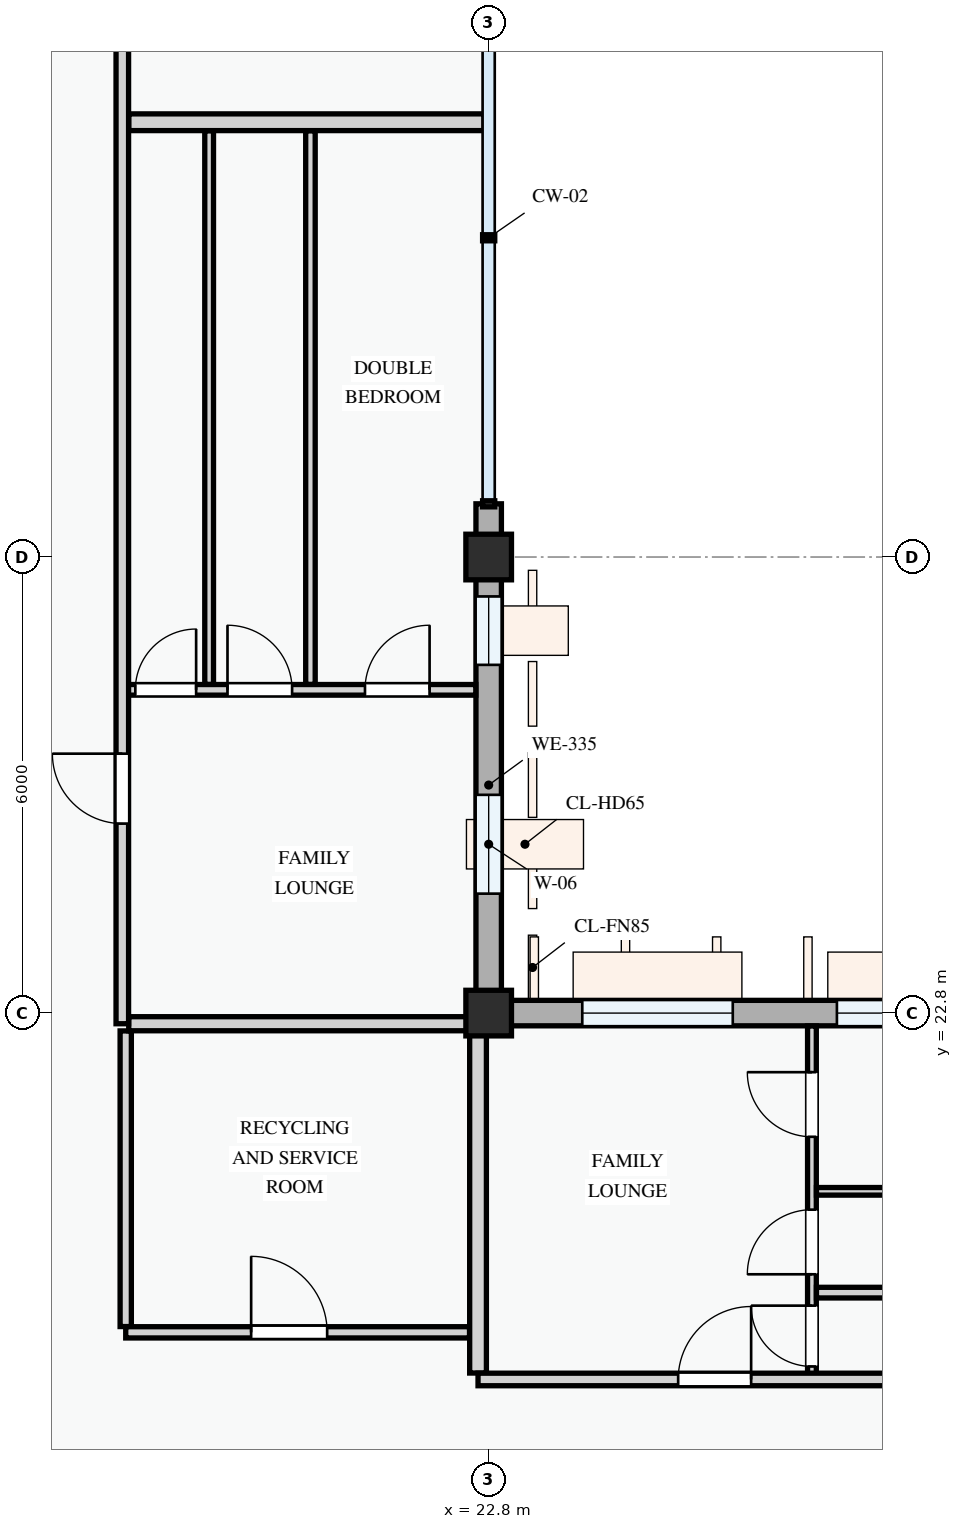
"""IFC4 building model, lengths in metres.
Left out: names, types, materials, properties, quantities, classifications, styles, units other than length and angle.
Written with IfcOpenShell. Run it as: python <this file> out.ifc"""

import sys

from ifc_helpers import new_model, si_unit, direction, frame, frame_2d, origin, origin_2d, place, context, subcontext, project, spatial, rectangle, extrude, element, fill, save


model = new_model("IFC4")
c1 = context("Model", 3, precision=1e-05, world=origin(), true_north=direction((0.0, 1.0)))
c2 = subcontext(c1, "Body", "Model", "MODEL_VIEW")
j1 = project(units=[si_unit("LENGTHUNIT", "METRE"), si_unit("PLANEANGLEUNIT", "RADIAN")], contexts=[c1])
p1 = place(None, origin())
s1 = spatial("IfcSite", under=j1, at=p1, CompositionType="ELEMENT")
p2 = place(p1, origin())
s2 = spatial("IfcBuilding", under=s1, at=p2, CompositionType="ELEMENT")
p3 = place(p2, frame((0.0, 0.0, 11.4)))
s3 = spatial("IfcBuildingStorey", under=s2, at=p3, CompositionType="ELEMENT", Elevation=11.4)
for number, where, z_axis, x_axis in (
    (1, (22.8, 22.8, 0.0), (0.0, 0.0, 1.0), (1.0, 0.0, 0.0)),
    (2, (22.8, 28.8, 0.0), (0.0, 0.0, 1.0), (1.0, 0.0, 0.0)),
):
    element("IfcColumn", number, at=place(p3, frame(where, z_axis=z_axis, x_axis=x_axis)), inside=s3, PredefinedType="COLUMN", context=c2, shape_type="SweptSolid", body=[
        extrude(rectangle(XDim=0.6, YDim=0.6, at=origin_2d()), origin(), (0.0, 0.0, 1.0), 3.3),
    ])
p4 = place(p3, frame((22.8, 22.8, 0.0), z_axis=(0.0, 0.0, 1.0), x_axis=(0.0, 1.0, 0.0)))
e3 = element("IfcWall", 3, at=p4, inside=s3, PredefinedType="STANDARD", context=c2, shape_type="SweptSolid", body=[
    extrude(rectangle(XDim=6.0, YDim=0.335, at=frame_2d((3.0, 0.0))), origin(), (0.0, 0.0, 1.0), 2.575),
])
p5 = place(p4, frame((1.571, 0.0, 0.78)))
e4 = element("IfcOpeningElement", 4, at=p5, cuts=e3, PredefinedType="OPENING", context=c2, shape_type="SweptSolid", body=[
    extrude(rectangle(XDim=1.3, YDim=1.4, at=frame_2d((0.65, 0.7))), frame((0.0, 0.177, 0.0), z_axis=(0.0, -1.0, 0.0), x_axis=(1.0, 0.0, 0.0)), (0.0, 0.0, 1.0), 0.355),
])
p6 = place(p4, frame((4.581, 0.0, 0.78)))
e5 = element("IfcOpeningElement", 5, at=p6, cuts=e3, PredefinedType="OPENING", context=c2, shape_type="SweptSolid", body=[
    extrude(rectangle(XDim=0.9, YDim=1.2, at=frame_2d((0.45, 0.6))), frame((0.0, 0.177, 0.0), z_axis=(0.0, -1.0, 0.0), x_axis=(1.0, 0.0, 0.0)), (0.0, 0.0, 1.0), 0.355),
])
p7 = place(p3, frame((22.8, 28.8, 0.0), z_axis=(0.0, 0.0, 1.0), x_axis=(0.0, 1.0, 0.0)))
e6 = element("IfcWall", 6, at=p7, inside=s3, PredefinedType="STANDARD", context=c2, shape_type="SweptSolid", body=[
    extrude(rectangle(XDim=0.7, YDim=0.335, at=frame_2d((0.35, 0.0))), origin(), (0.0, 0.0, 1.0), 2.425),
])
p8 = place(p3, frame((28.8, 22.8, 0.0), z_axis=(0.0, 0.0, 1.0), x_axis=(-1.0, 0.0, 0.0)))
e7 = element("IfcWall", 7, at=p8, inside=s3, PredefinedType="STANDARD", context=c2, shape_type="SweptSolid", body=[
    extrude(rectangle(XDim=6.0, YDim=0.335, at=frame_2d((3.0, 0.0))), origin(), (0.0, 0.0, 1.0), 2.475),
])
p9 = place(p8, frame((0.519, 0.0, 0.78)))
e8 = element("IfcOpeningElement", 8, at=p9, cuts=e7, PredefinedType="OPENING", context=c2, shape_type="SweptSolid", body=[
    extrude(rectangle(XDim=0.9, YDim=1.2, at=frame_2d((0.45, 0.6))), frame((0.0, 0.177, 0.0), z_axis=(0.0, -1.0, 0.0), x_axis=(1.0, 0.0, 0.0)), (0.0, 0.0, 1.0), 0.355),
])
p10 = place(p8, frame((2.789, 0.0, 0.78)))
e9 = element("IfcOpeningElement", 9, at=p10, cuts=e7, PredefinedType="OPENING", context=c2, shape_type="SweptSolid", body=[
    extrude(rectangle(XDim=1.98, YDim=1.5, at=frame_2d((0.99, 0.75))), frame((0.0, 0.177, 0.0), z_axis=(0.0, -1.0, 0.0), x_axis=(1.0, 0.0, 0.0)), (0.0, 0.0, 1.0), 0.355),
])
p11 = place(p3, frame((18.025, 18.676, 0.0), z_axis=(0.0, 0.0, 1.0), x_axis=(0.0, 1.0, 0.0)))
e10 = element("IfcWall", 10, at=p11, inside=s3, PredefinedType="PARTITIONING", context=c2, shape_type="SweptSolid", body=[
    extrude(rectangle(XDim=3.889, YDim=0.148, at=frame_2d((1.945, 0.0))), origin(), (0.0, 0.0, 1.0), 3.0),
])
p12 = place(p3, frame((18.025, 18.6, 0.0), z_axis=(0.0, 0.0, 1.0), x_axis=(1.0, 0.0, 0.0)))
e11 = element("IfcWall", 11, at=p12, inside=s3, PredefinedType="PARTITIONING", context=c2, shape_type="SweptSolid", body=[
    extrude(rectangle(XDim=4.523, YDim=0.148, at=frame_2d((2.262, 0.0))), origin(), (0.0, 0.0, 1.0), 3.0),
])
p13 = place(p12, frame((1.65, 0.0, 0.0)))
e12 = element("IfcOpeningElement", 12, at=p13, cuts=e11, PredefinedType="OPENING", context=c2, shape_type="SweptSolid", body=[
    extrude(rectangle(XDim=1.0, YDim=2.15, at=frame_2d((0.5, 1.075))), frame((0.0, 0.084, 0.0), z_axis=(0.0, -1.0, 0.0), x_axis=(1.0, 0.0, 0.0)), (0.0, 0.0, 1.0), 0.168),
])
p14 = place(p3, frame((17.98, 27.053, 0.0), z_axis=(0.0, 0.0, 1.0), x_axis=(1.0, 0.0, 0.0)))
e13 = element("IfcWall", 13, at=p14, inside=s3, PredefinedType="PARTITIONING", context=c2, shape_type="SweptSolid", body=[
    extrude(rectangle(XDim=4.651, YDim=0.14, at=frame_2d((2.325, 0.0))), origin(), (0.0, 0.0, 1.0), 3.0),
])
p15 = place(p14, frame((0.171, 0.0, 0.0)))
e14 = element("IfcOpeningElement", 14, at=p15, cuts=e13, PredefinedType="OPENING", context=c2, shape_type="SweptSolid", body=[
    extrude(rectangle(XDim=0.8, YDim=2.1, at=frame_2d((0.4, 1.05))), frame((0.0, 0.08, 0.0), z_axis=(0.0, -1.0, 0.0), x_axis=(1.0, 0.0, 0.0)), (0.0, 0.0, 1.0), 0.16),
])
p16 = place(p14, frame((1.384, 0.0, 0.0)))
e15 = element("IfcOpeningElement", 15, at=p16, cuts=e13, PredefinedType="OPENING", context=c2, shape_type="SweptSolid", body=[
    extrude(rectangle(XDim=0.85, YDim=2.1, at=frame_2d((0.425, 1.05))), frame((0.0, 0.08, 0.0), z_axis=(0.0, -1.0, 0.0), x_axis=(1.0, 0.0, 0.0)), (0.0, 0.0, 1.0), 0.16),
])
p17 = place(p14, frame((3.193, 0.0, 0.0)))
e16 = element("IfcOpeningElement", 16, at=p17, cuts=e13, PredefinedType="OPENING", context=c2, shape_type="SweptSolid", body=[
    extrude(rectangle(XDim=0.85, YDim=2.1, at=frame_2d((0.425, 1.05))), frame((0.0, 0.08, 0.0), z_axis=(0.0, -1.0, 0.0), x_axis=(1.0, 0.0, 0.0)), (0.0, 0.0, 1.0), 0.16),
])
p18 = place(p3, frame((20.455, 27.125, 0.0), z_axis=(0.0, 0.0, 1.0), x_axis=(0.0, 1.0, 0.0)))
e17 = element("IfcWall", 17, at=p18, inside=s3, PredefinedType="PARTITIONING", context=c2, shape_type="SweptSolid", body=[
    extrude(rectangle(XDim=7.283, YDim=0.125, at=frame_2d((3.642, 0.0))), origin(), (0.0, 0.0, 1.0), 3.0),
])
p19 = place(p3, frame((19.122, 27.125, 0.0), z_axis=(0.0, 0.0, 1.0), x_axis=(0.0, 1.0, 0.0)))
e18 = element("IfcWall", 18, at=p19, inside=s3, PredefinedType="PARTITIONING", context=c2, shape_type="SweptSolid", body=[
    extrude(rectangle(XDim=7.283, YDim=0.115, at=frame_2d((3.642, 0.0))), origin(), (0.0, 0.0, 1.0), 3.0),
])
p20 = place(p3, frame((18.064, 22.66, 0.0), z_axis=(0.0, 0.0, 1.0), x_axis=(1.0, 0.0, 0.0)))
e19 = element("IfcWall", 19, at=p20, inside=s3, PredefinedType="PARTITIONING", context=c2, shape_type="SweptSolid", body=[
    extrude(rectangle(XDim=4.484, YDim=0.185, at=frame_2d((2.242, 0.0))), origin(), (0.0, 0.0, 1.0), 2.375),
])
p21 = place(p3, frame((18.064, 34.52, 0.0), z_axis=(0.0, 0.0, 1.0), x_axis=(1.0, 0.0, 0.0)))
e20 = element("IfcWall", 20, at=p21, inside=s3, PredefinedType="PARTITIONING", context=c2, shape_type="SweptSolid", body=[
    extrude(rectangle(XDim=4.676, YDim=0.22, at=frame_2d((2.338, 0.0))), origin(), (0.0, 0.0, 1.0), 3.0),
])
p22 = place(p3, frame((17.98, 22.66, 0.0), z_axis=(0.0, 0.0, 1.0), x_axis=(0.0, 1.0, 0.0)))
e21 = element("IfcWall", 21, at=p22, inside=s3, PredefinedType="PARTITIONING", context=c2, shape_type="SweptSolid", body=[
    extrude(rectangle(XDim=34.771, YDim=0.165, at=frame_2d((17.385, 0.0))), origin(), (0.0, 0.0, 1.0), 3.0),
])
p23 = place(p22, frame((2.633, 0.0, 0.0)))
e22 = element("IfcOpeningElement", 22, at=p23, cuts=e21, PredefinedType="OPENING", context=c2, shape_type="SweptSolid", body=[
    extrude(rectangle(XDim=0.92, YDim=2.1, at=frame_2d((0.46, 1.05))), frame((0.0, 0.093, 0.0), z_axis=(0.0, -1.0, 0.0), x_axis=(1.0, 0.0, 0.0)), (0.0, 0.0, 1.0), 0.185),
])
p24 = place(p22, frame((16.343, 0.0, 0.0)))
e23 = element("IfcOpeningElement", 23, at=p24, cuts=e21, PredefinedType="OPENING", context=c2, shape_type="SweptSolid", body=[
    extrude(rectangle(XDim=0.92, YDim=2.1, at=frame_2d((0.46, 1.05))), frame((0.0, 0.093, 0.0), z_axis=(0.0, -1.0, 0.0), x_axis=(1.0, 0.0, 0.0)), (0.0, 0.0, 1.0), 0.185),
])
p25 = place(p22, frame((24.313, 0.0, 0.0)))
e24 = element("IfcOpeningElement", 24, at=p25, cuts=e21, PredefinedType="OPENING", context=c2, shape_type="SweptSolid", body=[
    extrude(rectangle(XDim=0.92, YDim=2.1, at=frame_2d((0.46, 1.05))), frame((0.0, 0.093, 0.0), z_axis=(0.0, -1.0, 0.0), x_axis=(1.0, 0.0, 0.0)), (0.0, 0.0, 1.0), 0.185),
])
p26 = place(p3, frame((27.053, 17.98, 0.0), z_axis=(0.0, 0.0, 1.0), x_axis=(0.0, 1.0, 0.0)))
e25 = element("IfcWall", 25, at=p26, inside=s3, PredefinedType="PARTITIONING", context=c2, shape_type="SweptSolid", body=[
    extrude(rectangle(XDim=4.651, YDim=0.115, at=frame_2d((2.325, 0.0))), origin(), (0.0, 0.0, 1.0), 3.0),
])
p27 = place(p26, frame((0.171, 0.0, 0.0)))
e26 = element("IfcOpeningElement", 26, at=p27, cuts=e25, PredefinedType="OPENING", context=c2, shape_type="SweptSolid", body=[
    extrude(rectangle(XDim=0.8, YDim=2.1, at=frame_2d((0.4, 1.05))), frame((0.0, 0.067, 0.0), z_axis=(0.0, -1.0, 0.0), x_axis=(1.0, 0.0, 0.0)), (0.0, 0.0, 1.0), 0.135),
])
p28 = place(p26, frame((1.384, 0.0, 0.0)))
e27 = element("IfcOpeningElement", 27, at=p28, cuts=e25, PredefinedType="OPENING", context=c2, shape_type="SweptSolid", body=[
    extrude(rectangle(XDim=0.85, YDim=2.1, at=frame_2d((0.425, 1.05))), frame((0.0, 0.067, 0.0), z_axis=(0.0, -1.0, 0.0), x_axis=(1.0, 0.0, 0.0)), (0.0, 0.0, 1.0), 0.135),
])
p29 = place(p26, frame((3.193, 0.0, 0.0)))
e28 = element("IfcOpeningElement", 28, at=p29, cuts=e25, PredefinedType="OPENING", context=c2, shape_type="SweptSolid", body=[
    extrude(rectangle(XDim=0.85, YDim=2.1, at=frame_2d((0.425, 1.05))), frame((0.0, 0.067, 0.0), z_axis=(0.0, -1.0, 0.0), x_axis=(1.0, 0.0, 0.0)), (0.0, 0.0, 1.0), 0.135),
])
p30 = place(p3, frame((27.112, 20.455, 0.0), z_axis=(0.0, 0.0, 1.0), x_axis=(1.0, 0.0, 0.0)))
e29 = element("IfcWall", 29, at=p30, inside=s3, PredefinedType="PARTITIONING", context=c2, shape_type="SweptSolid", body=[
    extrude(rectangle(XDim=7.306, YDim=0.1, at=frame_2d((3.653, 0.0))), origin(), (0.0, 0.0, 1.0), 3.0),
])
p31 = place(p3, frame((27.112, 19.122, 0.0), z_axis=(0.0, 0.0, 1.0), x_axis=(1.0, 0.0, 0.0)))
e30 = element("IfcWall", 30, at=p31, inside=s3, PredefinedType="PARTITIONING", context=c2, shape_type="SweptSolid", body=[
    extrude(rectangle(XDim=7.306, YDim=0.14, at=frame_2d((3.653, 0.0))), origin(), (0.0, 0.0, 1.0), 3.0),
])
p32 = place(p3, frame((22.66, 18.064, 0.0), z_axis=(0.0, 0.0, 1.0), x_axis=(0.0, 1.0, 0.0)))
e31 = element("IfcWall", 31, at=p32, inside=s3, PredefinedType="PARTITIONING", context=c2, shape_type="SweptSolid", body=[
    extrude(rectangle(XDim=4.676, YDim=0.22, at=frame_2d((2.338, 0.0))), origin(), (0.0, 0.0, 1.0), 2.425),
])
p33 = place(p3, frame((22.66, 17.98, 0.0), z_axis=(0.0, 0.0, 1.0), x_axis=(1.0, 0.0, 0.0)))
e32 = element("IfcWall", 32, at=p33, inside=s3, PredefinedType="PARTITIONING", context=c2, shape_type="SweptSolid", body=[
    extrude(rectangle(XDim=34.88, YDim=0.165, at=frame_2d((17.44, 0.0))), origin(), (0.0, 0.0, 1.0), 3.0),
])
p34 = place(p33, frame((2.633, 0.0, 0.0)))
e33 = element("IfcOpeningElement", 33, at=p34, cuts=e32, PredefinedType="OPENING", context=c2, shape_type="SweptSolid", body=[
    extrude(rectangle(XDim=0.96, YDim=2.12, at=frame_2d((0.48, 1.06))), frame((0.0, 0.093, 0.0), z_axis=(0.0, -1.0, 0.0), x_axis=(1.0, 0.0, 0.0)), (0.0, 0.0, 1.0), 0.185),
])
p35 = place(p33, frame((16.343, 0.0, 0.0)))
e34 = element("IfcOpeningElement", 34, at=p35, cuts=e32, PredefinedType="OPENING", context=c2, shape_type="SweptSolid", body=[
    extrude(rectangle(XDim=0.92, YDim=2.1, at=frame_2d((0.46, 1.05))), frame((0.0, 0.093, 0.0), z_axis=(0.0, -1.0, 0.0), x_axis=(1.0, 0.0, 0.0)), (0.0, 0.0, 1.0), 0.185),
])
p36 = place(p33, frame((24.313, 0.0, 0.0)))
e35 = element("IfcOpeningElement", 35, at=p36, cuts=e32, PredefinedType="OPENING", context=c2, shape_type="SweptSolid", body=[
    extrude(rectangle(XDim=0.92, YDim=2.1, at=frame_2d((0.46, 1.05))), frame((0.0, 0.093, 0.0), z_axis=(0.0, -1.0, 0.0), x_axis=(1.0, 0.0, 0.0)), (0.0, 0.0, 1.0), 0.185),
])
p37 = place(p5, origin())
e36 = element("IfcWindow", 36, at=p37, inside=s3, PartitioningType="SINGLE_PANEL", PredefinedType="WINDOW", context=c2, shape_type="SweptSolid", body=[
    extrude(rectangle(XDim=1.3, YDim=1.4, at=frame_2d((0.65, 0.7))), frame((0.0, 0.03, 0.0), z_axis=(0.0, -1.0, 0.0), x_axis=(1.0, 0.0, 0.0)), (0.0, 0.0, 1.0), 0.06),
])
fill(e4, e36)
p38 = place(p6, origin())
e37 = element("IfcWindow", 37, at=p38, inside=s3, PartitioningType="SINGLE_PANEL", PredefinedType="WINDOW", context=c2, shape_type="SweptSolid", body=[
    extrude(rectangle(XDim=0.9, YDim=1.2, at=frame_2d((0.45, 0.6))), frame((0.0, 0.03, 0.0), z_axis=(0.0, -1.0, 0.0), x_axis=(1.0, 0.0, 0.0)), (0.0, 0.0, 1.0), 0.06),
])
fill(e5, e37)
p39 = place(p9, origin())
e38 = element("IfcWindow", 38, at=p39, inside=s3, PartitioningType="SINGLE_PANEL", PredefinedType="WINDOW", context=c2, shape_type="SweptSolid", body=[
    extrude(rectangle(XDim=0.9, YDim=1.2, at=frame_2d((0.45, 0.6))), frame((0.0, 0.03, 0.0), z_axis=(0.0, -1.0, 0.0), x_axis=(1.0, 0.0, 0.0)), (0.0, 0.0, 1.0), 0.06),
])
fill(e8, e38)
p40 = place(p10, origin())
e39 = element("IfcWindow", 39, at=p40, inside=s3, PartitioningType="DOUBLE_PANEL_VERTICAL", PredefinedType="WINDOW", context=c2, shape_type="SweptSolid", body=[
    extrude(rectangle(XDim=1.98, YDim=1.5, at=frame_2d((0.99, 0.75))), frame((0.0, 0.03, 0.0), z_axis=(0.0, -1.0, 0.0), x_axis=(1.0, 0.0, 0.0)), (0.0, 0.0, 1.0), 0.06),
])
fill(e9, e39)
p41 = place(p13, origin())
e40 = element("IfcDoor", 40, at=p41, inside=s3, OperationType="SINGLE_SWING_LEFT", PredefinedType="DOOR", context=c2, shape_type="SweptSolid", body=[
    extrude(rectangle(XDim=1.0, YDim=2.15, at=frame_2d((0.5, 1.075))), frame((0.0, 0.025, 0.0), z_axis=(0.0, -1.0, 0.0), x_axis=(1.0, 0.0, 0.0)), (0.0, 0.0, 1.0), 0.05),
])
fill(e12, e40)
p42 = place(p15, origin())
e41 = element("IfcDoor", 41, at=p42, inside=s3, OperationType="SINGLE_SWING_RIGHT", PredefinedType="DOOR", context=c2, shape_type="SweptSolid", body=[
    extrude(rectangle(XDim=0.8, YDim=2.1, at=frame_2d((0.4, 1.05))), frame((0.0, 0.025, 0.0), z_axis=(0.0, -1.0, 0.0), x_axis=(1.0, 0.0, 0.0)), (0.0, 0.0, 1.0), 0.05),
])
fill(e14, e41)
p43 = place(p16, origin())
e42 = element("IfcDoor", 42, at=p43, inside=s3, OperationType="SINGLE_SWING_LEFT", PredefinedType="DOOR", context=c2, shape_type="SweptSolid", body=[
    extrude(rectangle(XDim=0.85, YDim=2.1, at=frame_2d((0.425, 1.05))), frame((0.0, 0.025, 0.0), z_axis=(0.0, -1.0, 0.0), x_axis=(1.0, 0.0, 0.0)), (0.0, 0.0, 1.0), 0.05),
])
fill(e15, e42)
p44 = place(p17, origin())
e43 = element("IfcDoor", 43, at=p44, inside=s3, OperationType="SINGLE_SWING_RIGHT", PredefinedType="DOOR", context=c2, shape_type="SweptSolid", body=[
    extrude(rectangle(XDim=0.85, YDim=2.1, at=frame_2d((0.425, 1.05))), frame((0.0, 0.025, 0.0), z_axis=(0.0, -1.0, 0.0), x_axis=(1.0, 0.0, 0.0)), (0.0, 0.0, 1.0), 0.05),
])
fill(e16, e43)
p45 = place(p23, origin())
e44 = element("IfcDoor", 44, at=p45, inside=s3, OperationType="SINGLE_SWING_RIGHT", PredefinedType="DOOR", context=c2, shape_type="SweptSolid", body=[
    extrude(rectangle(XDim=0.92, YDim=2.1, at=frame_2d((0.46, 1.05))), frame((0.0, 0.025, 0.0), z_axis=(0.0, -1.0, 0.0), x_axis=(1.0, 0.0, 0.0)), (0.0, 0.0, 1.0), 0.05),
])
fill(e22, e44)
p46 = place(p27, origin())
e45 = element("IfcDoor", 45, at=p46, inside=s3, OperationType="SINGLE_SWING_RIGHT", PredefinedType="DOOR", context=c2, shape_type="SweptSolid", body=[
    extrude(rectangle(XDim=0.8, YDim=2.1, at=frame_2d((0.4, 1.05))), frame((0.0, 0.025, 0.0), z_axis=(0.0, -1.0, 0.0), x_axis=(1.0, 0.0, 0.0)), (0.0, 0.0, 1.0), 0.05),
])
fill(e26, e45)
p47 = place(p28, origin())
e46 = element("IfcDoor", 46, at=p47, inside=s3, OperationType="SINGLE_SWING_LEFT", PredefinedType="DOOR", context=c2, shape_type="SweptSolid", body=[
    extrude(rectangle(XDim=0.85, YDim=2.1, at=frame_2d((0.425, 1.05))), frame((0.0, 0.025, 0.0), z_axis=(0.0, -1.0, 0.0), x_axis=(1.0, 0.0, 0.0)), (0.0, 0.0, 1.0), 0.05),
])
fill(e27, e46)
p48 = place(p29, origin())
e47 = element("IfcDoor", 47, at=p48, inside=s3, OperationType="SINGLE_SWING_RIGHT", PredefinedType="DOOR", context=c2, shape_type="SweptSolid", body=[
    extrude(rectangle(XDim=0.85, YDim=2.1, at=frame_2d((0.425, 1.05))), frame((0.0, 0.025, 0.0), z_axis=(0.0, -1.0, 0.0), x_axis=(1.0, 0.0, 0.0)), (0.0, 0.0, 1.0), 0.05),
])
fill(e28, e47)
p49 = place(p34, origin())
e48 = element("IfcDoor", 48, at=p49, inside=s3, OperationType="SINGLE_SWING_RIGHT", PredefinedType="DOOR", context=c2, shape_type="SweptSolid", body=[
    extrude(rectangle(XDim=0.96, YDim=2.12, at=frame_2d((0.48, 1.06))), frame((0.0, 0.025, 0.0), z_axis=(0.0, -1.0, 0.0), x_axis=(1.0, 0.0, 0.0)), (0.0, 0.0, 1.0), 0.05),
])
fill(e33, e48)
save(model, sys.argv[1])
